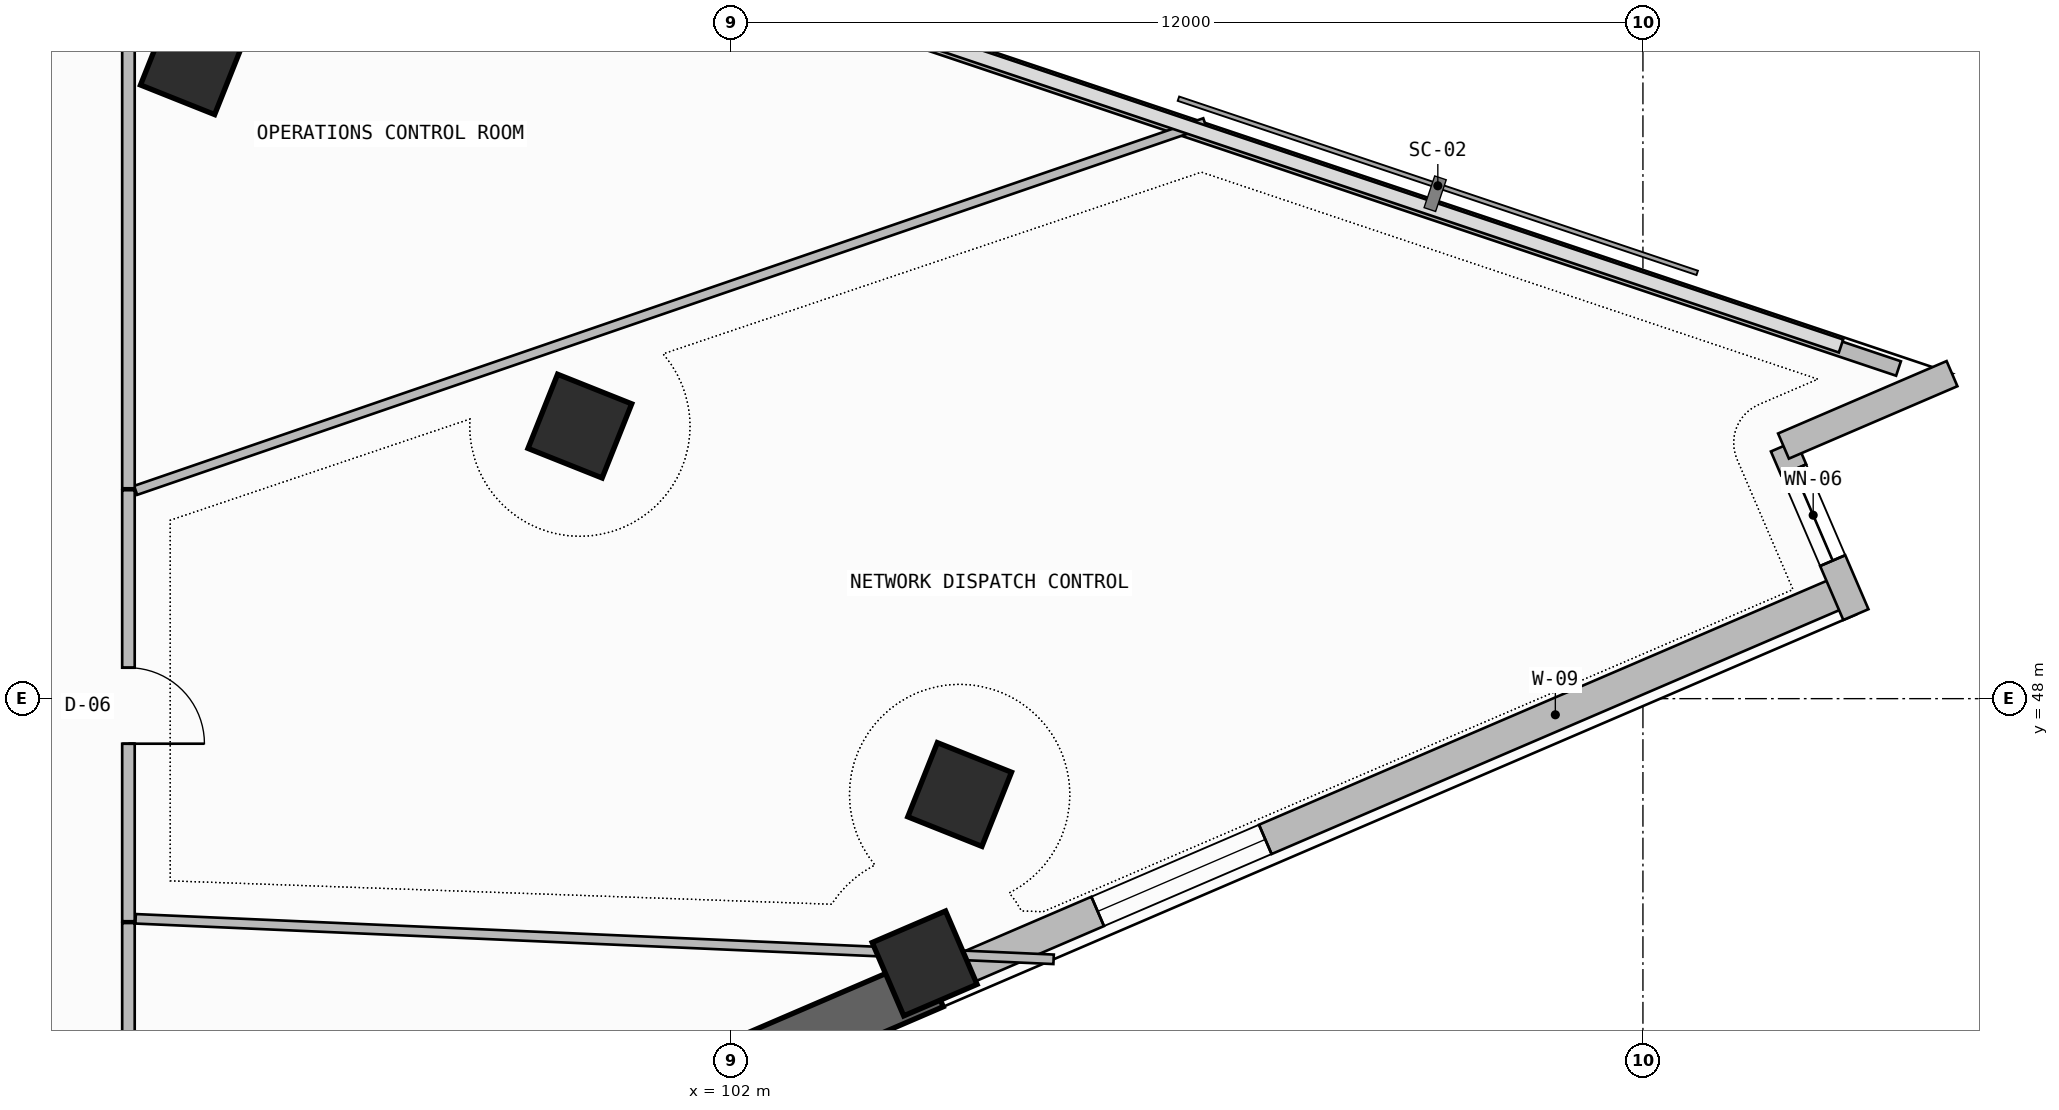
"""IFC4 building model, lengths in metres.
Left out: names, types, materials, properties, quantities, classifications, styles, units other than length and angle.
Written with IfcOpenShell. Run it as: python <this file> out.ifc"""

import sys

from ifc_helpers import new_model, si_unit, direction, frame, frame_2d, origin, origin_2d, place, context, subcontext, project, spatial, rectangle, extrude, element, fill, save


model = new_model("IFC4")
c1 = context("Model", 3, precision=1e-05, world=origin(), true_north=direction((0.0, 1.0)))
c2 = subcontext(c1, "Body", "Model", "MODEL_VIEW")
j1 = project(units=[si_unit("LENGTHUNIT", "METRE"), si_unit("PLANEANGLEUNIT", "RADIAN")], contexts=[c1])
p1 = place(None, origin())
s1 = spatial("IfcSite", under=j1, at=p1, CompositionType="ELEMENT")
p2 = place(p1, origin())
s2 = spatial("IfcBuilding", under=s1, at=p2, CompositionType="ELEMENT")
p3 = place(p2, frame((0.0, 0.0, 186.14)))
s3 = spatial("IfcBuildingStorey", under=s2, at=p3, CompositionType="ELEMENT", Elevation=186.14)
for number, where, z_axis, x_axis in (
    (1, (104.549, 44.517, 0.0), (0.0, 0.0, 1.0), (0.919, 0.395, 0.0)),
    (2, (105.01, 46.739, 0.0), (0.0, 0.0, 1.0), (0.371, 0.929, 0.0)),
    (3, (100.013, 51.585, 0.0), (0.0, 0.0, 1.0), (0.371, 0.929, 0.0)),
    (4, (94.915, 56.367, 0.0), (0.0, 0.0, 1.0), (0.371, 0.929, 0.0)),
):
    element("IfcColumn", number, at=place(p3, frame(where, z_axis=z_axis, x_axis=x_axis)), inside=s3, PredefinedType="COLUMN", context=c2, shape_type="SweptSolid", body=[
        extrude(rectangle(XDim=1.05, YDim=1.05, at=origin_2d()), origin(), (0.0, 0.0, 1.0), 3.52),
    ])
p4 = place(p3, frame((96.937, 40.952, -0.26), z_axis=(0.0, 0.0, 1.0), x_axis=(0.918782407933, 0.394764343468, 0.0)))
e5 = element("IfcWall", 5, at=p4, inside=s3, PredefinedType="SHEAR", context=c2, shape_type="SweptSolid", body=[
    extrude(rectangle(XDim=8.402, YDim=0.7, at=frame_2d((4.201, 0.0))), origin(), (0.0, 0.0, 1.0), 3.52),
])
p5 = place(p4, frame((3.294, 0.0, 1.2)))
e6 = element("IfcOpeningElement", 6, at=p5, cuts=e5, PredefinedType="OPENING", context=c2, shape_type="SweptSolid", body=[
    extrude(rectangle(XDim=2.4, YDim=0.9, at=frame_2d((1.2, 0.45))), frame((0.0, 0.36, 0.0), z_axis=(0.0, -1.0, 0.0), x_axis=(1.0, 0.0, 0.0)), (0.0, 0.0, 1.0), 0.72),
])
p6 = place(p3, frame((104.656, 44.269, 0.0), z_axis=(0.0, 0.0, 1.0), x_axis=(0.918789071809, 0.394748833467, 0.0)))
e7 = element("IfcWall", 7, at=p6, inside=s3, PredefinedType="SOLIDWALL", context=c2, shape_type="SweptSolid", body=[
    extrude(rectangle(XDim=13.069, YDim=0.42, at=frame_2d((6.534, 0.0))), origin(), (0.0, 0.0, 1.0), 2.245),
])
p7 = place(p6, frame((2.362, 0.0, 1.2)))
e8 = element("IfcOpeningElement", 8, at=p7, cuts=e7, PredefinedType="OPENING", context=c2, shape_type="SweptSolid", body=[
    extrude(rectangle(XDim=2.4, YDim=0.9, at=frame_2d((1.2, 0.45))), frame((0.0, 0.22, 0.0), z_axis=(0.0, -1.0, 0.0), x_axis=(1.0, 0.0, 0.0)), (0.0, 0.0, 1.0), 0.44),
])
p8 = place(p3, frame((116.802, 49.106, 0.0), z_axis=(0.0, 0.0, 1.0), x_axis=(-0.394712707157, 0.918804592288, 0.0)))
e9 = element("IfcWall", 9, at=p8, inside=s3, PredefinedType="SOLIDWALL", context=c2, shape_type="SweptSolid", body=[
    extrude(rectangle(XDim=2.414, YDim=0.36, at=frame_2d((1.207, 0.0))), origin(), (0.0, 0.0, 1.0), 3.26),
])
p9 = place(p8, frame((0.773, 0.0, 0.45)))
e10 = element("IfcOpeningElement", 10, at=p9, cuts=e9, PredefinedType="OPENING", context=c2, shape_type="SweptSolid", body=[
    extrude(rectangle(XDim=1.3, YDim=2.4, at=frame_2d((0.65, 1.2))), frame((0.0, 0.19, 0.0), z_axis=(0.0, -1.0, 0.0), x_axis=(1.0, 0.0, 0.0)), (0.0, 0.0, 1.0), 0.38),
])
p10 = place(p3, frame((115.849, 51.323, 0.0), z_axis=(0.0, 0.0, 1.0), x_axis=(0.918788830096, 0.394749396062, 0.0)))
e11 = element("IfcWall", 11, at=p10, inside=s3, PredefinedType="SOLIDWALL", context=c2, shape_type="SweptSolid", body=[
    extrude(rectangle(XDim=2.413, YDim=0.36, at=frame_2d((1.207, 0.0))), origin(), (0.0, 0.0, 1.0), 3.26),
])
p11 = place(p3, frame((117.363, 52.344, 0.0), z_axis=(0.0, 0.0, 1.0), x_axis=(-0.94800468727, 0.31825636351, 0.0)))
e12 = element("IfcWall", 12, at=p11, inside=s3, PredefinedType="PARAPET", context=c2, shape_type="SweptSolid", body=[
    extrude(rectangle(XDim=31.869, YDim=0.2, at=frame_2d((15.935, 0.0))), origin(), (0.0, 0.0, 1.0), 1.15),
])
p12 = place(p3, frame((94.074, 45.072, 0.0), z_axis=(0.0, 0.0, 1.0), x_axis=(0.0, 1.0, 0.0)))
e13 = element("IfcWall", 13, at=p12, inside=s3, PredefinedType="PARTITIONING", context=c2, shape_type="SweptSolid", body=[
    extrude(rectangle(XDim=5.67, YDim=0.165, at=frame_2d((2.835, 0.0))), origin(), (0.0, 0.0, 1.0), 2.745),
])
p13 = place(p12, frame((2.335, 0.0, 0.0)))
e14 = element("IfcOpeningElement", 14, at=p13, cuts=e13, PredefinedType="OPENING", context=c2, shape_type="SweptSolid", body=[
    extrude(rectangle(XDim=1.0, YDim=2.2, at=frame_2d((0.5, 1.1))), frame((0.0, 0.093, 0.0), z_axis=(0.0, -1.0, 0.0), x_axis=(1.0, 0.0, 0.0)), (0.0, 0.0, 1.0), 0.185),
])
p14 = place(p3, frame((106.246, 44.571, 0.0), z_axis=(0.0, 0.0, 1.0), x_axis=(-0.999028718702, 0.044063808377, 0.0)))
e15 = element("IfcWall", 15, at=p14, inside=s3, PredefinedType="PARTITIONING", context=c2, shape_type="SweptSolid", body=[
    extrude(rectangle(XDim=12.09, YDim=0.125, at=frame_2d((6.045, 0.0))), origin(), (0.0, 0.0, 1.0), 2.245),
])
p15 = place(p3, frame((94.168, 50.74, 0.0), z_axis=(0.0, 0.0, 1.0), x_axis=(0.945674142281, 0.325116004867, 0.0)))
e16 = element("IfcWall", 16, at=p15, inside=s3, PredefinedType="PARTITIONING", context=c2, shape_type="SweptSolid", body=[
    extrude(rectangle(XDim=14.875, YDim=0.125, at=frame_2d((7.438, 0.0))), origin(), (0.0, 0.0, 1.0), 2.645),
])
p16 = place(p3, frame((94.074, 41.137, 0.0), z_axis=(0.0, 0.0, 1.0), x_axis=(0.0, 1.0, 0.0)))
e17 = element("IfcWall", 17, at=p16, inside=s3, PredefinedType="PARTITIONING", context=c2, shape_type="SweptSolid", body=[
    extrude(rectangle(XDim=3.911, YDim=0.165, at=frame_2d((1.956, 0.0))), origin(), (0.0, 0.0, 1.0), 2.745),
])
p17 = place(p3, frame((94.074, 50.768, 0.0), z_axis=(0.0, 0.0, 1.0), x_axis=(0.0, 1.0, 0.0)))
e18 = element("IfcWall", 18, at=p17, inside=s3, PredefinedType="PARTITIONING", context=c2, shape_type="SweptSolid", body=[
    extrude(rectangle(XDim=8.057, YDim=0.165, at=frame_2d((4.028, 0.0))), origin(), (0.0, 0.0, 1.0), 2.645),
])
p18 = place(p7, origin())
e19 = element("IfcWindow", 19, at=p18, inside=s3, PartitioningType="SINGLE_PANEL", PredefinedType="WINDOW", context=c2, shape_type="SweptSolid", body=[
    extrude(rectangle(XDim=2.4, YDim=0.9, at=frame_2d((1.2, 0.45))), frame((0.0, 0.03, 0.0), z_axis=(0.0, -1.0, 0.0), x_axis=(1.0, 0.0, 0.0)), (0.0, 0.0, 1.0), 0.06),
])
fill(e8, e19)
p19 = place(p9, origin())
e20 = element("IfcWindow", 20, at=p19, inside=s3, PartitioningType="SINGLE_PANEL", PredefinedType="WINDOW", context=c2, shape_type="SweptSolid", body=[
    extrude(rectangle(XDim=1.3, YDim=2.4, at=frame_2d((0.65, 1.2))), frame((0.0, 0.03, 0.0), z_axis=(0.0, -1.0, 0.0), x_axis=(1.0, 0.0, 0.0)), (0.0, 0.0, 1.0), 0.06),
])
fill(e10, e20)
p20 = place(p13, frame((1.0, 0.0, 0.0), z_axis=(0.0, 0.0, 1.0), x_axis=(-1.0, 0.0, 0.0)))
e21 = element("IfcDoor", 21, at=p20, inside=s3, OperationType="SINGLE_SWING_RIGHT", PredefinedType="DOOR", context=c2, shape_type="SweptSolid", body=[
    extrude(rectangle(XDim=1.0, YDim=2.2, at=frame_2d((0.5, 1.1))), frame((0.0, 0.025, 0.0), z_axis=(0.0, -1.0, 0.0), x_axis=(1.0, 0.0, 0.0)), (0.0, 0.0, 1.0), 0.05),
])
fill(e14, e21)
save(model, sys.argv[1])
